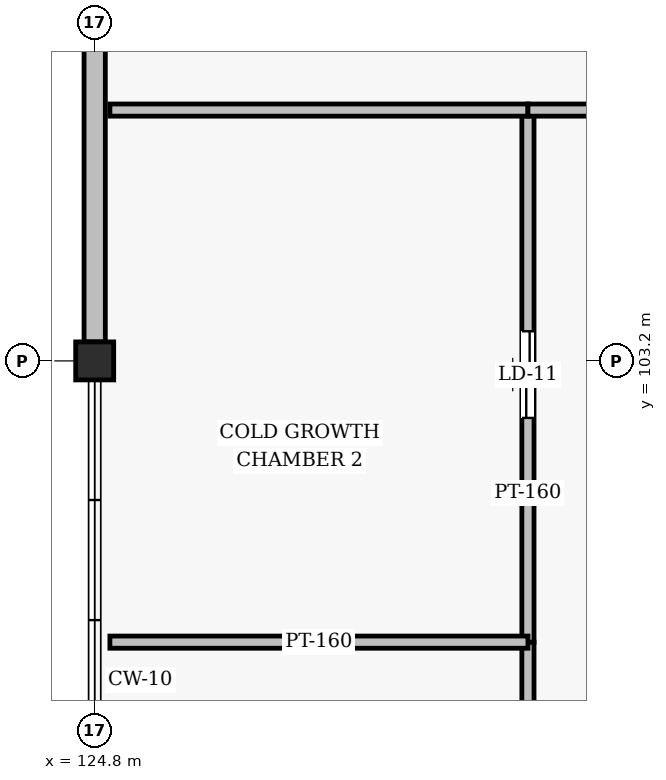
"""IFC4 building model, lengths in metres.
Left out: names, types, materials, properties, quantities, classifications, styles, units other than length and angle.
Written with IfcOpenShell. Run it as: python <this file> out.ifc"""

import sys

from ifc_helpers import new_model, si_unit, direction, frame, frame_2d, origin, origin_2d, place, context, subcontext, project, spatial, rectangle, hollow_rectangle, extrude, element, fill, save


model = new_model("IFC4")
c1 = context("Model", 3, precision=1e-05, world=origin(), true_north=direction((0.0, 1.0)))
c2 = subcontext(c1, "Body", "Model", "MODEL_VIEW")
j1 = project(units=[si_unit("LENGTHUNIT", "METRE"), si_unit("PLANEANGLEUNIT", "RADIAN")], contexts=[c1])
p1 = place(None, origin())
s1 = spatial("IfcSite", under=j1, at=p1, CompositionType="ELEMENT")
p2 = place(p1, origin())
s2 = spatial("IfcBuilding", under=s1, at=p2, CompositionType="ELEMENT")
p3 = place(p2, frame((0.0, 0.0, 39.6)))
s3 = spatial("IfcBuildingStorey", under=s2, at=p3, CompositionType="ELEMENT", Elevation=39.6)
p4 = place(p3, frame((124.8, 103.2, 0.0), z_axis=(0.0, 0.0, 1.0), x_axis=(1.0, 0.0, 0.0)))
e1 = element("IfcColumn", 1, at=p4, inside=s3, PredefinedType="COLUMN", context=c2, shape_type="SweptSolid", body=[
    extrude(hollow_rectangle(XDim=0.5, YDim=0.5, WallThickness=0.02, InnerFilletRadius=0.02, OuterFilletRadius=0.04, at=origin_2d()), origin(), (0.0, 0.0, 1.0), 3.6),
])
p5 = place(p3, frame((124.8, 114.95, 0.0), z_axis=(0.0, 0.0, 1.0), x_axis=(0.0, -1.0, 0.0)))
e2 = element("IfcWall", 2, at=p5, inside=s3, PredefinedType="SOLIDWALL", context=c2, shape_type="SweptSolid", body=[
    extrude(rectangle(XDim=11.5, YDim=0.28, at=frame_2d((5.75, 0.0))), origin(), (0.0, 0.0, 1.0), 2.55),
])
p6 = place(p3, frame((130.5, 92.3, 0.0), z_axis=(0.0, 0.0, 1.0), x_axis=(0.0, 1.0, 0.0)))
e3 = element("IfcWall", 3, at=p6, inside=s3, PredefinedType="PARTITIONING", context=c2, shape_type="SweptSolid", body=[
    extrude(rectangle(XDim=7.2, YDim=0.16, at=frame_2d((3.6, 0.0))), origin(), (0.0, 0.0, 1.0), 2.842),
])
p7 = place(p6, frame((3.05, 0.0, 0.0)))
e4 = element("IfcOpeningElement", 4, at=p7, cuts=e3, PredefinedType="OPENING", context=c2, shape_type="SweptSolid", body=[
    extrude(rectangle(XDim=1.14, YDim=2.12, at=frame_2d((0.57, 1.06))), frame((0.0, 0.09, 0.0), z_axis=(0.0, -1.0, 0.0), x_axis=(1.0, 0.0, 0.0)), (0.0, 0.0, 1.0), 0.18),
])
p8 = place(p3, frame((130.5, 99.5, 0.0), z_axis=(0.0, 0.0, 1.0), x_axis=(0.0, 1.0, 0.0)))
e5 = element("IfcWall", 5, at=p8, inside=s3, PredefinedType="PARTITIONING", context=c2, shape_type="SweptSolid", body=[
    extrude(rectangle(XDim=7.0, YDim=0.16, at=frame_2d((3.5, 0.0))), origin(), (0.0, 0.0, 1.0), 2.842),
])
p9 = place(p8, frame((2.95, 0.0, 0.0)))
e6 = element("IfcOpeningElement", 6, at=p9, cuts=e5, PredefinedType="OPENING", context=c2, shape_type="SweptSolid", body=[
    extrude(rectangle(XDim=1.14, YDim=2.12, at=frame_2d((0.57, 1.06))), frame((0.0, 0.09, 0.0), z_axis=(0.0, -1.0, 0.0), x_axis=(1.0, 0.0, 0.0)), (0.0, 0.0, 1.0), 0.18),
])
for number, where, z_axis, x_axis in (
    (7, (125.0, 99.5, 0.0), (0.0, 0.0, 1.0), (1.0, 0.0, 0.0)),
    (8, (125.0, 106.5, 0.0), (0.0, 0.0, 1.0), (1.0, 0.0, 0.0)),
):
    element("IfcWall", number, at=place(p3, frame(where, z_axis=z_axis, x_axis=x_axis)), inside=s3, PredefinedType="PARTITIONING", context=c2, shape_type="SweptSolid", body=[
        extrude(rectangle(XDim=5.5, YDim=0.16, at=frame_2d((2.75, 0.0))), origin(), (0.0, 0.0, 1.0), 3.342),
    ])
p10 = place(p3, frame((130.5, 106.5, 0.0), z_axis=(0.0, 0.0, 1.0), x_axis=(1.0, 0.0, 0.0)))
e9 = element("IfcWall", 9, at=p10, inside=s3, PredefinedType="PARTITIONING", context=c2, shape_type="SweptSolid", body=[
    extrude(rectangle(XDim=5.6, YDim=0.16, at=frame_2d((2.8, 0.0))), origin(), (0.0, 0.0, 1.0), 2.592),
])
p11 = place(p10, frame((2.2, 0.0, 0.0)))
e10 = element("IfcOpeningElement", 10, at=p11, cuts=e9, PredefinedType="OPENING", context=c2, shape_type="SweptSolid", body=[
    extrude(rectangle(XDim=1.25, YDim=2.12, at=frame_2d((0.625, 1.06))), frame((0.0, 0.09, 0.0), z_axis=(0.0, -1.0, 0.0), x_axis=(1.0, 0.0, 0.0)), (0.0, 0.0, 1.0), 0.18),
])
p12 = place(p9, origin())
e11 = element("IfcDoor", 11, at=p12, inside=s3, OperationType="SINGLE_SWING_RIGHT", PredefinedType="DOOR", context=c2, shape_type="SweptSolid", body=[
    extrude(rectangle(XDim=1.14, YDim=2.12, at=frame_2d((0.57, 1.06))), frame((0.0, 0.025, 0.0), z_axis=(0.0, -1.0, 0.0), x_axis=(1.0, 0.0, 0.0)), (0.0, 0.0, 1.0), 0.05),
])
fill(e6, e11)
save(model, sys.argv[1])
